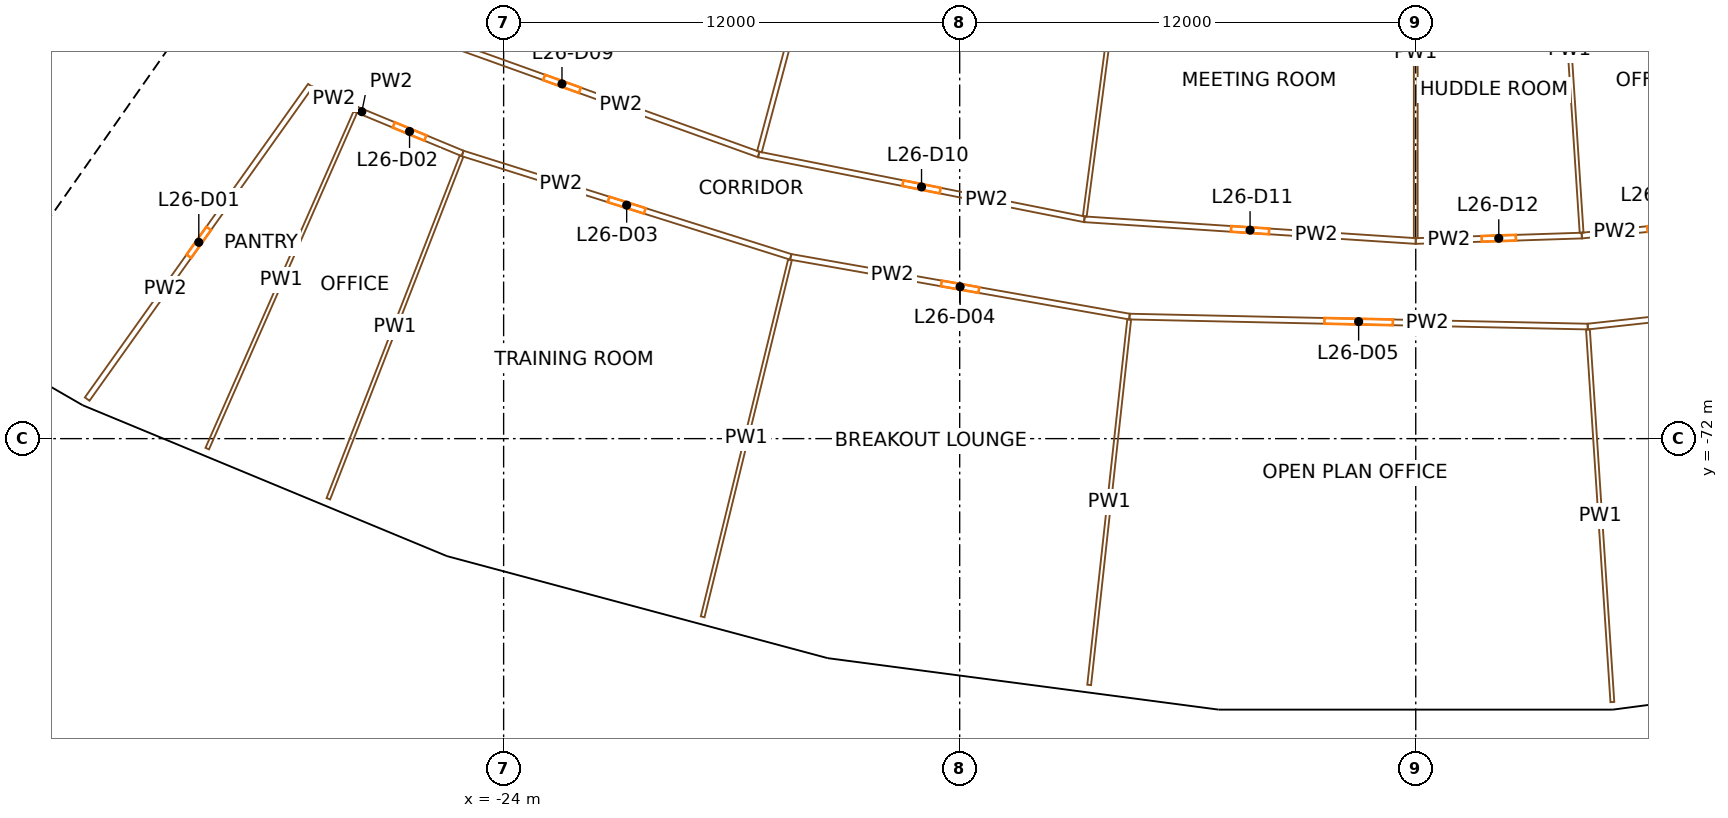
"""IFC4 building model, lengths in metres.
Left out: names, types, materials, properties, quantities, classifications, styles, units other than length and angle.
Written with IfcOpenShell. Run it as: python <this file> out.ifc"""

import sys

from ifc_helpers import new_model, si_unit, direction, frame, frame_2d, origin, origin_2d, place, context, subcontext, project, spatial, rectangle, extrude, element, fill, save


model = new_model("IFC4")
c1 = context("Model", 3, precision=1e-05, world=origin(), true_north=direction((0.0, 1.0)))
c2 = subcontext(c1, "Body", "Model", "MODEL_VIEW")
j1 = project(units=[si_unit("LENGTHUNIT", "METRE"), si_unit("PLANEANGLEUNIT", "RADIAN")], contexts=[c1])
p1 = place(None, origin())
s1 = spatial("IfcSite", under=j1, at=p1, CompositionType="ELEMENT")
p2 = place(p1, origin())
s2 = spatial("IfcBuilding", under=s1, at=p2, CompositionType="ELEMENT")
p3 = place(p2, frame((0.0, 0.0, 117.7)))
s3 = spatial("IfcBuildingStorey", under=s2, at=p3, CompositionType="ELEMENT", Elevation=117.7)
for number, where, z_axis, x_axis in (
    (1, (-34.388, -69.732, 0.0), (0.0, 0.0, 1.0), (0.897, -0.442, 0.0)),
    (2, (-24.992, -73.624, 0.0), (0.0, 0.0, 1.0), (0.947, -0.321, 0.0)),
    (3, (-15.168, -76.256, 0.0), (0.0, 0.0, 1.0), (0.981, -0.195, 0.0)),
    (4, (-5.085, -77.583, 0.0), (0.0, 0.0, 1.0), (0.998, -0.065, 0.0)),
    (5, (5.085, -77.583, 0.0), (0.0, 0.0, 1.0), (0.998, 0.065, 0.0)),
):
    element("IfcColumn", number, at=place(p3, frame(where, z_axis=z_axis, x_axis=x_axis)), inside=s3, PredefinedType="COLUMN", context=c2, shape_type="SweptSolid", body=[
        extrude(rectangle(XDim=1.2, YDim=1.5, at=origin_2d()), origin(), (0.0, 0.0, 1.0), 3.8),
    ])
p4 = place(p3, frame((-36.717, -66.337, 0.0), z_axis=(0.0, 0.0, 1.0), x_axis=(0.573577477574, 0.819151315216, 0.0)))
e6 = element("IfcWall", 6, at=p4, inside=s3, PredefinedType="SHEAR", context=c2, shape_type="SweptSolid", body=[
    extrude(rectangle(XDim=14.8, YDim=0.9, at=frame_2d((7.4, 0.0))), origin(), (0.0, 0.0, 1.0), 3.5),
])
p5 = place(p4, frame((6.2, 0.0, 0.0)))
e7 = element("IfcOpeningElement", 7, at=p5, cuts=e6, PredefinedType="OPENING", context=c2, shape_type="SweptSolid", body=[
    extrude(rectangle(XDim=2.4, YDim=2.1, at=frame_2d((1.2, 1.05))), frame((0.0, 0.46, 0.0), z_axis=(0.0, -1.0, 0.0), x_axis=(1.0, 0.0, 0.0)), (0.0, 0.0, 1.0), 0.92),
])
p6 = place(p3, frame((-35.221, -63.417, 0.0), z_axis=(0.0, 0.0, 1.0), x_axis=(-0.819166993208, 0.573555086491, 0.0)))
e8 = element("IfcWall", 8, at=p6, inside=s3, PredefinedType="SOLIDWALL", context=c2, shape_type="SweptSolid", body=[
    extrude(rectangle(XDim=7.95, YDim=0.3, at=frame_2d((3.975, 0.0))), origin(), (0.0, 0.0, 1.0), 3.5),
])
p7 = place(p3, frame((-31.799, -72.262, 0.0), z_axis=(0.0, 0.0, 1.0), x_axis=(0.402773288685, 0.915299774894, 0.0)))
e9 = element("IfcWall", 9, at=p7, inside=s3, PredefinedType="PARTITIONING", context=c2, shape_type="SweptSolid", body=[
    extrude(rectangle(XDim=9.674, YDim=0.1, at=frame_2d((4.837, 0.0))), origin(), (0.0, 0.0, 1.0), 2.4),
])
p8 = place(p3, frame((-29.084, -62.71, 0.0), z_axis=(0.0, 0.0, 1.0), x_axis=(-0.580031092611, -0.814594335608, 0.0)))
e10 = element("IfcWall", 10, at=p8, inside=s3, PredefinedType="PARTITIONING", context=c2, shape_type="SweptSolid", body=[
    extrude(rectangle(XDim=10.126, YDim=0.15, at=frame_2d((5.063, 0.0))), origin(), (0.0, 0.0, 1.0), 2.4),
])
p9 = place(p8, frame((4.613, 0.0, 0.0)))
e11 = element("IfcOpeningElement", 11, at=p9, cuts=e10, PredefinedType="OPENING", context=c2, shape_type="SweptSolid", body=[
    extrude(rectangle(XDim=0.9, YDim=2.1, at=frame_2d((0.45, 1.05))), frame((0.0, 0.085, 0.0), z_axis=(0.0, -1.0, 0.0), x_axis=(1.0, 0.0, 0.0)), (0.0, 0.0, 1.0), 0.17),
])
p10 = place(p3, frame((-29.059, -62.802, 0.0), z_axis=(0.0, 0.0, 1.0), x_axis=(0.911173247906, -0.412023436592, 0.0)))
e12 = element("IfcWall", 12, at=p10, inside=s3, PredefinedType="PARTITIONING", context=c2, shape_type="SweptSolid", body=[
    extrude(rectangle(XDim=1.303, YDim=0.15, at=frame_2d((0.651, 0.0))), origin(), (0.0, 0.0, 1.0), 2.4),
])
p11 = place(p3, frame((-28.612, -73.582, 0.0), z_axis=(0.0, 0.0, 1.0), x_axis=(0.362392675792, 0.93202550852, 0.0)))
e13 = element("IfcWall", 13, at=p11, inside=s3, PredefinedType="PARTITIONING", context=c2, shape_type="SweptSolid", body=[
    extrude(rectangle(XDim=9.674, YDim=0.1, at=frame_2d((4.837, 0.0))), origin(), (0.0, 0.0, 1.0), 2.4),
])
p12 = place(p3, frame((-25.079, -64.496, 0.0), z_axis=(0.0, 0.0, 1.0), x_axis=(-0.923896753446, 0.382641854705, 0.0)))
e14 = element("IfcWall", 14, at=p12, inside=s3, PredefinedType="PARTITIONING", context=c2, shape_type="SweptSolid", body=[
    extrude(rectangle(XDim=3.023, YDim=0.15, at=frame_2d((1.511, 0.0))), origin(), (0.0, 0.0, 1.0), 2.4),
])
p13 = place(p12, frame((1.062, 0.0, 0.0)))
e15 = element("IfcOpeningElement", 15, at=p13, cuts=e14, PredefinedType="OPENING", context=c2, shape_type="SweptSolid", body=[
    extrude(rectangle(XDim=0.9, YDim=2.1, at=frame_2d((0.45, 1.05))), frame((0.0, 0.085, 0.0), z_axis=(0.0, -1.0, 0.0), x_axis=(1.0, 0.0, 0.0)), (0.0, 0.0, 1.0), 0.17),
])
p14 = place(p3, frame((-27.64, -60.807, 0.0), z_axis=(0.0, 0.0, 1.0), x_axis=(0.941150861554, -0.337986768669, 0.0)))
e16 = element("IfcWall", 16, at=p14, inside=s3, PredefinedType="PARTITIONING", context=c2, shape_type="SweptSolid", body=[
    extrude(rectangle(XDim=10.998, YDim=0.15, at=frame_2d((5.499, 0.0))), origin(), (0.0, 0.0, 1.0), 2.4),
])
p15 = place(p14, frame((4.999, 0.0, 0.0)))
e17 = element("IfcOpeningElement", 17, at=p15, cuts=e16, PredefinedType="OPENING", context=c2, shape_type="SweptSolid", body=[
    extrude(rectangle(XDim=1.0, YDim=2.1, at=frame_2d((0.5, 1.05))), frame((0.0, 0.085, 0.0), z_axis=(0.0, -1.0, 0.0), x_axis=(1.0, 0.0, 0.0)), (0.0, 0.0, 1.0), 0.17),
])
p16 = place(p3, frame((-16.446, -67.217, 0.0), z_axis=(0.0, 0.0, 1.0), x_axis=(-0.953724416281, 0.300682120834, 0.0)))
e18 = element("IfcWall", 18, at=p16, inside=s3, PredefinedType="PARTITIONING", context=c2, shape_type="SweptSolid", body=[
    extrude(rectangle(XDim=9.052, YDim=0.15, at=frame_2d((4.526, 0.0))), origin(), (0.0, 0.0, 1.0), 2.4),
])
p17 = place(p16, frame((4.026, 0.0, 0.0)))
e19 = element("IfcOpeningElement", 19, at=p17, cuts=e18, PredefinedType="OPENING", context=c2, shape_type="SweptSolid", body=[
    extrude(rectangle(XDim=1.0, YDim=2.1, at=frame_2d((0.5, 1.05))), frame((0.0, 0.085, 0.0), z_axis=(0.0, -1.0, 0.0), x_axis=(1.0, 0.0, 0.0)), (0.0, 0.0, 1.0), 0.17),
])
p18 = place(p3, frame((-18.763, -76.687, 0.0), z_axis=(0.0, 0.0, 1.0), x_axis=(0.237657357205, 0.971349051869, 0.0)))
e20 = element("IfcWall", 20, at=p18, inside=s3, PredefinedType="PARTITIONING", context=c2, shape_type="SweptSolid", body=[
    extrude(rectangle(XDim=9.674, YDim=0.1, at=frame_2d((4.837, 0.0))), origin(), (0.0, 0.0, 1.0), 2.4),
])
p19 = place(p3, frame((-17.289, -64.524, 0.0), z_axis=(0.0, 0.0, 1.0), x_axis=(0.980786466832, -0.195084357342, 0.0)))
e21 = element("IfcWall", 21, at=p19, inside=s3, PredefinedType="PARTITIONING", context=c2, shape_type="SweptSolid", body=[
    extrude(rectangle(XDim=8.738, YDim=0.15, at=frame_2d((4.369, 0.0))), origin(), (0.0, 0.0, 1.0), 2.4),
])
p20 = place(p19, frame((3.869, 0.0, 0.0)))
e22 = element("IfcOpeningElement", 22, at=p20, cuts=e21, PredefinedType="OPENING", context=c2, shape_type="SweptSolid", body=[
    extrude(rectangle(XDim=1.0, YDim=2.1, at=frame_2d((0.5, 1.05))), frame((0.0, 0.085, 0.0), z_axis=(0.0, -1.0, 0.0), x_axis=(1.0, 0.0, 0.0)), (0.0, 0.0, 1.0), 0.17),
])
p21 = place(p3, frame((-7.532, -68.789, 0.0), z_axis=(0.0, 0.0, 1.0), x_axis=(-0.984813412134, 0.173616080133, 0.0)))
e23 = element("IfcWall", 23, at=p21, inside=s3, PredefinedType="PARTITIONING", context=c2, shape_type="SweptSolid", body=[
    extrude(rectangle(XDim=9.052, YDim=0.15, at=frame_2d((4.526, 0.0))), origin(), (0.0, 0.0, 1.0), 2.4),
])
p22 = place(p21, frame((4.026, 0.0, 0.0)))
e24 = element("IfcOpeningElement", 24, at=p22, cuts=e23, PredefinedType="OPENING", context=c2, shape_type="SweptSolid", body=[
    extrude(rectangle(XDim=1.0, YDim=2.1, at=frame_2d((0.5, 1.05))), frame((0.0, 0.085, 0.0), z_axis=(0.0, -1.0, 0.0), x_axis=(1.0, 0.0, 0.0)), (0.0, 0.0, 1.0), 0.17),
])
p23 = place(p3, frame((-14.747, -55.037, 0.0), z_axis=(0.0, 0.0, 1.0), x_axis=(-0.258833329344, -0.965921998725, 0.0)))
e25 = element("IfcWall", 25, at=p23, inside=s3, PredefinedType="MOVABLE", context=c2, shape_type="SweptSolid", body=[
    extrude(rectangle(XDim=9.746, YDim=0.125, at=frame_2d((4.873, 0.0))), origin(), (0.0, 0.0, 1.0), 2.4),
])
p24 = place(p3, frame((-8.719, -66.229, 0.0), z_axis=(0.0, 0.0, 1.0), x_axis=(0.997858593599, -0.065408158359, 0.0)))
e26 = element("IfcWall", 26, at=p24, inside=s3, PredefinedType="PARTITIONING", context=c2, shape_type="SweptSolid", body=[
    extrude(rectangle(XDim=8.738, YDim=0.15, at=frame_2d((4.369, 0.0))), origin(), (0.0, 0.0, 1.0), 2.4),
])
p25 = place(p24, frame((3.869, 0.0, 0.0)))
e27 = element("IfcOpeningElement", 27, at=p25, cuts=e26, PredefinedType="OPENING", context=c2, shape_type="SweptSolid", body=[
    extrude(rectangle(XDim=1.0, YDim=2.1, at=frame_2d((0.5, 1.05))), frame((0.0, 0.085, 0.0), z_axis=(0.0, -1.0, 0.0), x_axis=(1.0, 0.0, 0.0)), (0.0, 0.0, 1.0), 0.17),
])
p26 = place(p3, frame((-8.593, -78.48, 0.0), z_axis=(0.0, 0.0, 1.0), x_axis=(0.10884699726, 0.994058514972, 0.0)))
e28 = element("IfcWall", 28, at=p26, inside=s3, PredefinedType="PARTITIONING", context=c2, shape_type="SweptSolid", body=[
    extrude(rectangle(XDim=9.674, YDim=0.1, at=frame_2d((4.837, 0.0))), origin(), (0.0, 0.0, 1.0), 2.4),
])
p27 = place(p3, frame((4.526, -69.052, 0.0), z_axis=(0.0, 0.0, 1.0), x_axis=(-0.999762313962, 0.02180173346, 0.0)))
e29 = element("IfcWall", 29, at=p27, inside=s3, PredefinedType="PARTITIONING", context=c2, shape_type="SweptSolid", body=[
    extrude(rectangle(XDim=12.061, YDim=0.15, at=frame_2d((6.03, 0.0))), origin(), (0.0, 0.0, 1.0), 2.4),
])
p28 = place(p27, frame((5.13, 0.0, 0.0)))
e30 = element("IfcOpeningElement", 30, at=p28, cuts=e29, PredefinedType="OPENING", context=c2, shape_type="SweptSolid", body=[
    extrude(rectangle(XDim=1.8, YDim=2.1, at=frame_2d((0.9, 1.05))), frame((0.0, 0.085, 0.0), z_axis=(0.0, -1.0, 0.0), x_axis=(1.0, 0.0, 0.0)), (0.0, 0.0, 1.0), 0.17),
])
p29 = place(p3, frame((-7.437, -56.491, 0.0), z_axis=(0.0, 0.0, 1.0), x_axis=(-0.13053421433, -0.99144380521, 0.0)))
e31 = element("IfcWall", 31, at=p29, inside=s3, PredefinedType="PARTITIONING", context=c2, shape_type="SweptSolid", body=[
    extrude(rectangle(XDim=9.746, YDim=0.1, at=frame_2d((4.873, 0.0))), origin(), (0.0, 0.0, 1.0), 2.4),
])
p30 = place(p3, frame((0.0, -66.8, 0.0), z_axis=(0.0, 0.0, 1.0), x_axis=(0.99946426167, 0.03272903366, 0.0)))
e32 = element("IfcWall", 32, at=p30, inside=s3, PredefinedType="PARTITIONING", context=c2, shape_type="SweptSolid", body=[
    extrude(rectangle(XDim=4.371, YDim=0.15, at=frame_2d((2.186, 0.0))), origin(), (0.0, 0.0, 1.0), 2.4),
])
p31 = place(p30, frame((1.736, 0.0, 0.0)))
e33 = element("IfcOpeningElement", 33, at=p31, cuts=e32, PredefinedType="OPENING", context=c2, shape_type="SweptSolid", body=[
    extrude(rectangle(XDim=0.9, YDim=2.1, at=frame_2d((0.45, 1.05))), frame((0.0, 0.085, 0.0), z_axis=(0.0, -1.0, 0.0), x_axis=(1.0, 0.0, 0.0)), (0.0, 0.0, 1.0), 0.17),
])
p32 = place(p3, frame((0.0, -56.979, 0.0), z_axis=(0.0, 0.0, 1.0), x_axis=(0.0, -1.0, 0.0)))
e34 = element("IfcWall", 34, at=p32, inside=s3, PredefinedType="PARTITIONING", context=c2, shape_type="SweptSolid", body=[
    extrude(rectangle(XDim=9.747, YDim=0.1, at=frame_2d((4.873, 0.0))), origin(), (0.0, 0.0, 1.0), 2.4),
])
p33 = place(p3, frame((3.735, -56.978, 0.0), z_axis=(0.0, 0.0, 1.0), x_axis=(0.065392665599, -0.997859609006, 0.0)))
e35 = element("IfcWall", 35, at=p33, inside=s3, PredefinedType="PARTITIONING", context=c2, shape_type="SweptSolid", body=[
    extrude(rectangle(XDim=9.625, YDim=0.1, at=frame_2d((4.812, 0.0))), origin(), (0.0, 0.0, 1.0), 2.4),
])
p34 = place(p3, frame((4.369, -66.657, 0.0), z_axis=(0.0, 0.0, 1.0), x_axis=(0.995184826457, 0.098016127192, 0.0)))
e36 = element("IfcWall", 36, at=p34, inside=s3, PredefinedType="PARTITIONING", context=c2, shape_type="SweptSolid", body=[
    extrude(rectangle(XDim=4.371, YDim=0.15, at=frame_2d((2.186, 0.0))), origin(), (0.0, 0.0, 1.0), 2.4),
])
p35 = place(p34, frame((1.736, 0.0, 0.0)))
e37 = element("IfcOpeningElement", 37, at=p35, cuts=e36, PredefinedType="OPENING", context=c2, shape_type="SweptSolid", body=[
    extrude(rectangle(XDim=0.9, YDim=2.1, at=frame_2d((0.45, 1.05))), frame((0.0, 0.085, 0.0), z_axis=(0.0, -1.0, 0.0), x_axis=(1.0, 0.0, 0.0)), (0.0, 0.0, 1.0), 0.17),
])
p36 = place(p3, frame((10.529, -68.394, 0.0), z_axis=(0.0, 0.0, 1.0), x_axis=(-0.994055567966, -0.108873907782, 0.0)))
e38 = element("IfcWall", 38, at=p36, inside=s3, PredefinedType="PARTITIONING", context=c2, shape_type="SweptSolid", body=[
    extrude(rectangle(XDim=6.039, YDim=0.15, at=frame_2d((3.02, 0.0))), origin(), (0.0, 0.0, 1.0), 2.4),
])
p37 = place(p36, frame((2.52, 0.0, 0.0)))
e39 = element("IfcOpeningElement", 39, at=p37, cuts=e38, PredefinedType="OPENING", context=c2, shape_type="SweptSolid", body=[
    extrude(rectangle(XDim=1.0, YDim=2.1, at=frame_2d((0.5, 1.05))), frame((0.0, 0.085, 0.0), z_axis=(0.0, -1.0, 0.0), x_axis=(1.0, 0.0, 0.0)), (0.0, 0.0, 1.0), 0.17),
])
p38 = place(p3, frame((5.173, -78.931, 0.0), z_axis=(0.0, 0.0, 1.0), x_axis=(-0.065402415744, 0.997858970003, 0.0)))
e40 = element("IfcWall", 40, at=p38, inside=s3, PredefinedType="PARTITIONING", context=c2, shape_type="SweptSolid", body=[
    extrude(rectangle(XDim=9.825, YDim=0.1, at=frame_2d((4.913, 0.0))), origin(), (0.0, 0.0, 1.0), 2.4),
])
p39 = place(p9, origin())
e41 = element("IfcDoor", 41, at=p39, inside=s3, OperationType="SINGLE_SWING_RIGHT", PredefinedType="DOOR", context=c2, shape_type="SweptSolid", body=[
    extrude(rectangle(XDim=0.9, YDim=2.1, at=frame_2d((0.45, 1.05))), frame((0.0, 0.025, 0.0), z_axis=(0.0, -1.0, 0.0), x_axis=(1.0, 0.0, 0.0)), (0.0, 0.0, 1.0), 0.05),
])
fill(e11, e41)
p40 = place(p13, origin())
e42 = element("IfcDoor", 42, at=p40, inside=s3, OperationType="SINGLE_SWING_RIGHT", PredefinedType="DOOR", context=c2, shape_type="SweptSolid", body=[
    extrude(rectangle(XDim=0.9, YDim=2.1, at=frame_2d((0.45, 1.05))), frame((0.0, 0.025, 0.0), z_axis=(0.0, -1.0, 0.0), x_axis=(1.0, 0.0, 0.0)), (0.0, 0.0, 1.0), 0.05),
])
fill(e15, e42)
p41 = place(p17, origin())
e43 = element("IfcDoor", 43, at=p41, inside=s3, OperationType="SINGLE_SWING_RIGHT", PredefinedType="DOOR", context=c2, shape_type="SweptSolid", body=[
    extrude(rectangle(XDim=1.0, YDim=2.1, at=frame_2d((0.5, 1.05))), frame((0.0, 0.025, 0.0), z_axis=(0.0, -1.0, 0.0), x_axis=(1.0, 0.0, 0.0)), (0.0, 0.0, 1.0), 0.05),
])
fill(e19, e43)
p42 = place(p22, origin())
e44 = element("IfcDoor", 44, at=p42, inside=s3, OperationType="SINGLE_SWING_RIGHT", PredefinedType="DOOR", context=c2, shape_type="SweptSolid", body=[
    extrude(rectangle(XDim=1.0, YDim=2.1, at=frame_2d((0.5, 1.05))), frame((0.0, 0.025, 0.0), z_axis=(0.0, -1.0, 0.0), x_axis=(1.0, 0.0, 0.0)), (0.0, 0.0, 1.0), 0.05),
])
fill(e24, e44)
p43 = place(p28, origin())
e45 = element("IfcDoor", 45, at=p43, inside=s3, OperationType="DOUBLE_DOOR_SINGLE_SWING", PredefinedType="DOOR", context=c2, shape_type="SweptSolid", body=[
    extrude(rectangle(XDim=1.8, YDim=2.1, at=frame_2d((0.9, 1.05))), frame((0.0, 0.025, 0.0), z_axis=(0.0, -1.0, 0.0), x_axis=(1.0, 0.0, 0.0)), (0.0, 0.0, 1.0), 0.05),
])
fill(e30, e45)
p44 = place(p15, origin())
e46 = element("IfcDoor", 46, at=p44, inside=s3, OperationType="SINGLE_SWING_RIGHT", PredefinedType="DOOR", context=c2, shape_type="SweptSolid", body=[
    extrude(rectangle(XDim=1.0, YDim=2.1, at=frame_2d((0.5, 1.05))), frame((0.0, 0.025, 0.0), z_axis=(0.0, -1.0, 0.0), x_axis=(1.0, 0.0, 0.0)), (0.0, 0.0, 1.0), 0.05),
])
fill(e17, e46)
p45 = place(p20, origin())
e47 = element("IfcDoor", 47, at=p45, inside=s3, OperationType="SINGLE_SWING_RIGHT", PredefinedType="DOOR", context=c2, shape_type="SweptSolid", body=[
    extrude(rectangle(XDim=1.0, YDim=2.1, at=frame_2d((0.5, 1.05))), frame((0.0, 0.025, 0.0), z_axis=(0.0, -1.0, 0.0), x_axis=(1.0, 0.0, 0.0)), (0.0, 0.0, 1.0), 0.05),
])
fill(e22, e47)
p46 = place(p25, origin())
e48 = element("IfcDoor", 48, at=p46, inside=s3, OperationType="SINGLE_SWING_RIGHT", PredefinedType="DOOR", context=c2, shape_type="SweptSolid", body=[
    extrude(rectangle(XDim=1.0, YDim=2.1, at=frame_2d((0.5, 1.05))), frame((0.0, 0.025, 0.0), z_axis=(0.0, -1.0, 0.0), x_axis=(1.0, 0.0, 0.0)), (0.0, 0.0, 1.0), 0.05),
])
fill(e27, e48)
p47 = place(p31, origin())
e49 = element("IfcDoor", 49, at=p47, inside=s3, OperationType="SINGLE_SWING_RIGHT", PredefinedType="DOOR", context=c2, shape_type="SweptSolid", body=[
    extrude(rectangle(XDim=0.9, YDim=2.1, at=frame_2d((0.45, 1.05))), frame((0.0, 0.025, 0.0), z_axis=(0.0, -1.0, 0.0), x_axis=(1.0, 0.0, 0.0)), (0.0, 0.0, 1.0), 0.05),
])
fill(e33, e49)
p48 = place(p35, origin())
e50 = element("IfcDoor", 50, at=p48, inside=s3, OperationType="SINGLE_SWING_RIGHT", PredefinedType="DOOR", context=c2, shape_type="SweptSolid", body=[
    extrude(rectangle(XDim=0.9, YDim=2.1, at=frame_2d((0.45, 1.05))), frame((0.0, 0.025, 0.0), z_axis=(0.0, -1.0, 0.0), x_axis=(1.0, 0.0, 0.0)), (0.0, 0.0, 1.0), 0.05),
])
fill(e37, e50)
save(model, sys.argv[1])
